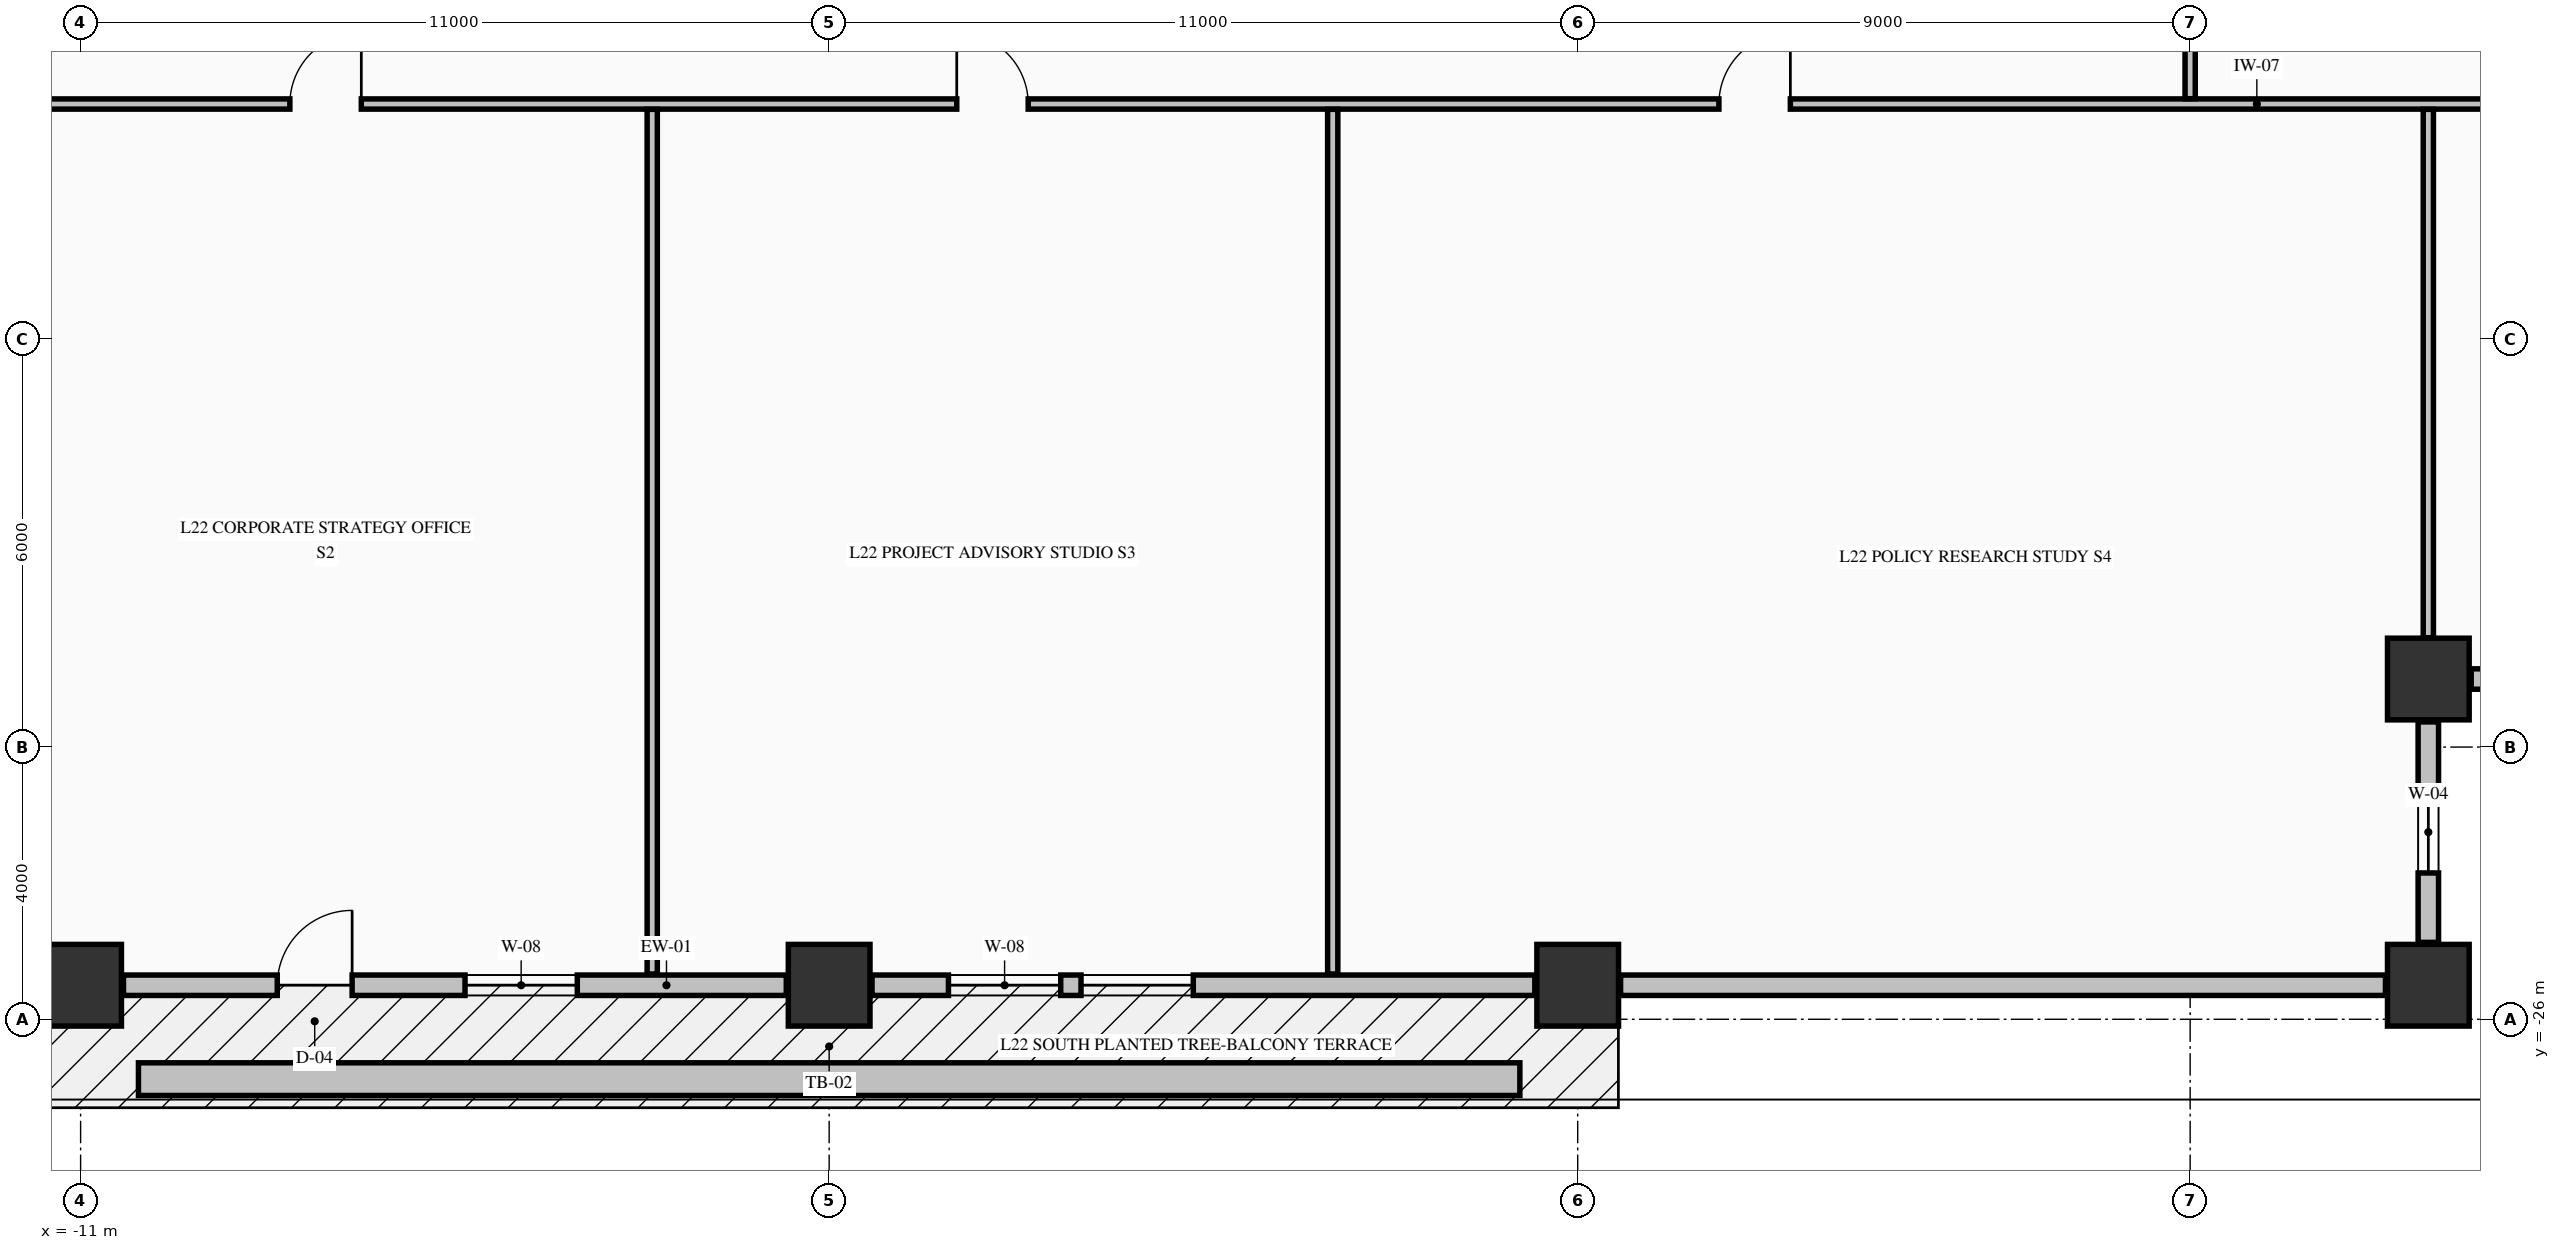
"""IFC4 building model, lengths in metres.
Left out: names, types, materials, properties, quantities, classifications, styles, units other than length and angle.
Written with IfcOpenShell. Run it as: python <this file> out.ifc"""

import sys

from ifc_helpers import new_model, si_unit, direction, frame, frame_2d, origin, origin_2d, place, context, subcontext, project, spatial, rectangle, extrude, element, fill, save


model = new_model("IFC4")
c1 = context("Model", 3, precision=1e-05, world=origin(), true_north=direction((0.0, 1.0)))
c2 = subcontext(c1, "Body", "Model", "MODEL_VIEW")
j1 = project(units=[si_unit("LENGTHUNIT", "METRE"), si_unit("PLANEANGLEUNIT", "RADIAN")], contexts=[c1])
p1 = place(None, origin())
s1 = spatial("IfcSite", under=j1, at=p1, CompositionType="ELEMENT")
p2 = place(p1, origin())
s2 = spatial("IfcBuilding", under=s1, at=p2, CompositionType="ELEMENT")
p3 = place(p2, frame((0.0, 0.0, 91.36)))
s3 = spatial("IfcBuildingStorey", under=s2, at=p3, CompositionType="ELEMENT", Elevation=91.36)
for number, where, z_axis, x_axis in (
    (1, (-11.0, -25.5, -0.25), (0.0, 0.0, 1.0), (1.0, 0.0, 0.0)),
    (2, (0.0, -25.5, -0.25), (0.0, 0.0, 1.0), (1.0, 0.0, 0.0)),
    (3, (11.0, -25.5, -0.25), (0.0, 0.0, 1.0), (1.0, 0.0, 0.0)),
    (4, (23.5, -25.5, -0.25), (0.0, 0.0, 1.0), (1.0, 0.0, 0.0)),
    (5, (23.5, -21.0, -0.25), (0.0, 0.0, 1.0), (1.0, 0.0, 0.0)),
):
    element("IfcColumn", number, at=place(p3, frame(where, z_axis=z_axis, x_axis=x_axis)), inside=s3, PredefinedType="COLUMN", context=c2, shape_type="SweptSolid", body=[
        extrude(rectangle(XDim=1.2, YDim=1.2, at=origin_2d()), origin(), (0.0, 0.0, 1.0), 3.57),
    ])
p4 = place(p3, frame((23.5, -24.87, 0.0), z_axis=(0.0, 0.0, 1.0), x_axis=(0.0, 1.0, 0.0)))
e6 = element("IfcWall", 6, at=p4, inside=s3, PredefinedType="STANDARD", context=c2, shape_type="SweptSolid", body=[
    extrude(rectangle(XDim=3.24, YDim=0.3, at=frame_2d((1.62, 0.0))), origin(), (0.0, 0.0, 1.0), 2.712),
])
p5 = place(p4, frame((1.02, 0.0, 0.82)))
e7 = element("IfcOpeningElement", 7, at=p5, cuts=e6, PredefinedType="OPENING", context=c2, shape_type="SweptSolid", body=[
    extrude(rectangle(XDim=1.2, YDim=1.65, at=frame_2d((0.6, 0.825))), frame((0.0, 0.16, 0.0), z_axis=(0.0, -1.0, 0.0), x_axis=(1.0, 0.0, 0.0)), (0.0, 0.0, 1.0), 0.32),
])
p6 = place(p3, frame((24.13, -21.0, 0.0), z_axis=(0.0, 0.0, 1.0), x_axis=(1.0, 0.0, 0.0)))
e8 = element("IfcWall", 8, at=p6, inside=s3, PredefinedType="STANDARD", context=c2, shape_type="SweptSolid", body=[
    extrude(rectangle(XDim=3.24, YDim=0.3, at=frame_2d((1.62, 0.0))), origin(), (0.0, 0.0, 1.0), 2.712),
])
p7 = place(p6, frame((1.02, 0.0, 0.82)))
e9 = element("IfcOpeningElement", 9, at=p7, cuts=e8, PredefinedType="OPENING", context=c2, shape_type="SweptSolid", body=[
    extrude(rectangle(XDim=1.2, YDim=1.65, at=frame_2d((0.6, 0.825))), frame((0.0, 0.16, 0.0), z_axis=(0.0, -1.0, 0.0), x_axis=(1.0, 0.0, 0.0)), (0.0, 0.0, 1.0), 0.32),
])
p8 = place(p3, frame((-10.37, -25.5, 0.0), z_axis=(0.0, 0.0, 1.0), x_axis=(1.0, 0.0, 0.0)))
e10 = element("IfcWall", 10, at=p8, inside=s3, PredefinedType="STANDARD", context=c2, shape_type="SweptSolid", body=[
    extrude(rectangle(XDim=9.74, YDim=0.3, at=frame_2d((4.87, 0.0))), origin(), (0.0, 0.0, 1.0), 2.712),
])
p9 = place(p8, frame((2.26, 0.0, 0.0)))
e11 = element("IfcOpeningElement", 11, at=p9, cuts=e10, PredefinedType="OPENING", context=c2, shape_type="SweptSolid", body=[
    extrude(rectangle(XDim=1.1, YDim=2.15, at=frame_2d((0.55, 1.075))), frame((0.0, 0.16, 0.0), z_axis=(0.0, -1.0, 0.0), x_axis=(1.0, 0.0, 0.0)), (0.0, 0.0, 1.0), 0.32),
])
p10 = place(p8, frame((5.019, 0.0, 0.8)))
e12 = element("IfcOpeningElement", 12, at=p10, cuts=e10, PredefinedType="OPENING", context=c2, shape_type="SweptSolid", body=[
    extrude(rectangle(XDim=1.65, YDim=1.7, at=frame_2d((0.825, 0.85))), frame((0.0, 0.16, 0.0), z_axis=(0.0, -1.0, 0.0), x_axis=(1.0, 0.0, 0.0)), (0.0, 0.0, 1.0), 0.32),
])
p11 = place(p3, frame((0.63, -25.5, 0.0), z_axis=(0.0, 0.0, 1.0), x_axis=(1.0, 0.0, 0.0)))
e13 = element("IfcWall", 13, at=p11, inside=s3, PredefinedType="STANDARD", context=c2, shape_type="SweptSolid", body=[
    extrude(rectangle(XDim=9.74, YDim=0.3, at=frame_2d((4.87, 0.0))), origin(), (0.0, 0.0, 1.0), 2.712),
])
p12 = place(p11, frame((1.123, 0.0, 0.8)))
e14 = element("IfcOpeningElement", 14, at=p12, cuts=e13, PredefinedType="OPENING", context=c2, shape_type="SweptSolid", body=[
    extrude(rectangle(XDim=1.65, YDim=1.7, at=frame_2d((0.825, 0.85))), frame((0.0, 0.16, 0.0), z_axis=(0.0, -1.0, 0.0), x_axis=(1.0, 0.0, 0.0)), (0.0, 0.0, 1.0), 0.32),
])
p13 = place(p11, frame((3.071, 0.0, 0.8)))
e15 = element("IfcOpeningElement", 15, at=p13, cuts=e13, PredefinedType="OPENING", context=c2, shape_type="SweptSolid", body=[
    extrude(rectangle(XDim=1.65, YDim=1.7, at=frame_2d((0.825, 0.85))), frame((0.0, 0.16, 0.0), z_axis=(0.0, -1.0, 0.0), x_axis=(1.0, 0.0, 0.0)), (0.0, 0.0, 1.0), 0.32),
])
p14 = place(p3, frame((11.63, -25.5, 0.0), z_axis=(0.0, 0.0, 1.0), x_axis=(1.0, 0.0, 0.0)))
e16 = element("IfcWall", 16, at=p14, inside=s3, PredefinedType="STANDARD", context=c2, shape_type="SweptSolid", body=[
    extrude(rectangle(XDim=11.24, YDim=0.3, at=frame_2d((5.62, 0.0))), origin(), (0.0, 0.0, 1.0), 2.712),
])
p15 = place(p3, frame((-22.835, -12.55, 0.0), z_axis=(0.0, 0.0, 1.0), x_axis=(1.0, 0.0, 0.0)))
e17 = element("IfcWall", 17, at=p15, inside=s3, PredefinedType="PARTITIONING", context=c2, shape_type="SweptSolid", body=[
    extrude(rectangle(XDim=50.67, YDim=0.15, at=frame_2d((25.335, 0.0))), origin(), (0.0, 0.0, 1.0), 3.32),
])
p16 = place(p15, frame((7.01, 0.0, 0.0)))
e18 = element("IfcOpeningElement", 18, at=p16, cuts=e17, PredefinedType="OPENING", context=c2, shape_type="SweptSolid", body=[
    extrude(rectangle(XDim=0.95, YDim=2.15, at=frame_2d((0.475, 1.075))), frame((0.0, 0.085, 0.0), z_axis=(0.0, -1.0, 0.0), x_axis=(1.0, 0.0, 0.0)), (0.0, 0.0, 1.0), 0.17),
])
p17 = place(p15, frame((14.91, 0.0, 0.0)))
e19 = element("IfcOpeningElement", 19, at=p17, cuts=e17, PredefinedType="OPENING", context=c2, shape_type="SweptSolid", body=[
    extrude(rectangle(XDim=1.05, YDim=2.15, at=frame_2d((0.525, 1.075))), frame((0.0, 0.085, 0.0), z_axis=(0.0, -1.0, 0.0), x_axis=(1.0, 0.0, 0.0)), (0.0, 0.0, 1.0), 0.17),
])
p18 = place(p15, frame((24.71, 0.0, 0.0)))
e20 = element("IfcOpeningElement", 20, at=p18, cuts=e17, PredefinedType="OPENING", context=c2, shape_type="SweptSolid", body=[
    extrude(rectangle(XDim=1.05, YDim=2.15, at=frame_2d((0.525, 1.075))), frame((0.0, 0.085, 0.0), z_axis=(0.0, -1.0, 0.0), x_axis=(1.0, 0.0, 0.0)), (0.0, 0.0, 1.0), 0.17),
])
p19 = place(p15, frame((35.91, 0.0, 0.0)))
e21 = element("IfcOpeningElement", 21, at=p19, cuts=e17, PredefinedType="OPENING", context=c2, shape_type="SweptSolid", body=[
    extrude(rectangle(XDim=1.05, YDim=2.15, at=frame_2d((0.525, 1.075))), frame((0.0, 0.085, 0.0), z_axis=(0.0, -1.0, 0.0), x_axis=(1.0, 0.0, 0.0)), (0.0, 0.0, 1.0), 0.17),
])
for number, where, z_axis, x_axis in (
    (22, (-2.6, -25.335, 0.0), (0.0, 0.0, 1.0), (0.0, 1.0, 0.0)),
    (23, (7.4, -25.335, 0.0), (0.0, 0.0, 1.0), (0.0, 1.0, 0.0)),
):
    element("IfcWall", number, at=place(p3, frame(where, z_axis=z_axis, x_axis=x_axis)), inside=s3, PredefinedType="PARTITIONING", context=c2, shape_type="SweptSolid", body=[
        extrude(rectangle(XDim=12.707, YDim=0.15, at=frame_2d((6.354, 0.0))), origin(), (0.0, 0.0, 1.0), 3.32),
    ])
p20 = place(p3, frame((20.0, -12.472, 0.0), z_axis=(0.0, 0.0, 1.0), x_axis=(0.0, 1.0, 0.0)))
e24 = element("IfcWall", 24, at=p20, inside=s3, PredefinedType="PARTITIONING", context=c2, shape_type="SweptSolid", body=[
    extrude(rectangle(XDim=2.016, YDim=0.15, at=frame_2d((1.008, 0.0))), origin(), (0.0, 0.0, 1.0), 2.81),
])
p21 = place(p20, frame((0.747, 0.0, 0.0)))
e25 = element("IfcOpeningElement", 25, at=p21, cuts=e24, PredefinedType="OPENING", context=c2, shape_type="SweptSolid", body=[
    extrude(rectangle(XDim=0.95, YDim=2.15, at=frame_2d((0.475, 1.075))), frame((0.0, 0.085, 0.0), z_axis=(0.0, -1.0, 0.0), x_axis=(1.0, 0.0, 0.0)), (0.0, 0.0, 1.0), 0.17),
])
p22 = place(p3, frame((23.5, -20.394, 0.0), z_axis=(0.0, 0.0, 1.0), x_axis=(0.0, 1.0, 0.0)))
e26 = element("IfcWall", 26, at=p22, inside=s3, PredefinedType="PARTITIONING", context=c2, shape_type="SweptSolid", body=[
    extrude(rectangle(XDim=7.766, YDim=0.15, at=frame_2d((3.883, 0.0))), origin(), (0.0, 0.0, 1.0), 3.32),
])
p23 = place(p3, frame((-10.15, -26.88, -0.04), z_axis=(0.0, 0.0, 1.0), x_axis=(1.0, 0.0, 0.0)))
e27 = element("IfcWall", 27, at=p23, inside=s3, PredefinedType="PARAPET", context=c2, shape_type="SweptSolid", body=[
    extrude(rectangle(XDim=20.3, YDim=0.48, at=frame_2d((10.15, 0.0))), origin(), (0.0, 0.0, 1.0), 0.52),
])
p24 = place(p5, origin())
e28 = element("IfcWindow", 28, at=p24, inside=s3, PartitioningType="SINGLE_PANEL", PredefinedType="WINDOW", context=c2, shape_type="SweptSolid", body=[
    extrude(rectangle(XDim=1.2, YDim=1.65, at=frame_2d((0.6, 0.825))), frame((0.0, 0.03, 0.0), z_axis=(0.0, -1.0, 0.0), x_axis=(1.0, 0.0, 0.0)), (0.0, 0.0, 1.0), 0.06),
])
fill(e7, e28)
p25 = place(p9, origin())
e29 = element("IfcDoor", 29, at=p25, inside=s3, OperationType="SINGLE_SWING_RIGHT", PredefinedType="DOOR", context=c2, shape_type="SweptSolid", body=[
    extrude(rectangle(XDim=1.1, YDim=2.15, at=frame_2d((0.55, 1.075))), frame((0.0, 0.025, 0.0), z_axis=(0.0, -1.0, 0.0), x_axis=(1.0, 0.0, 0.0)), (0.0, 0.0, 1.0), 0.05),
])
fill(e11, e29)
p26 = place(p10, origin())
e30 = element("IfcWindow", 30, at=p26, inside=s3, PartitioningType="SINGLE_PANEL", PredefinedType="WINDOW", context=c2, shape_type="SweptSolid", body=[
    extrude(rectangle(XDim=1.65, YDim=1.7, at=frame_2d((0.825, 0.85))), frame((0.0, 0.03, 0.0), z_axis=(0.0, -1.0, 0.0), x_axis=(1.0, 0.0, 0.0)), (0.0, 0.0, 1.0), 0.06),
])
fill(e12, e30)
p27 = place(p12, origin())
e31 = element("IfcWindow", 31, at=p27, inside=s3, PartitioningType="SINGLE_PANEL", PredefinedType="WINDOW", context=c2, shape_type="SweptSolid", body=[
    extrude(rectangle(XDim=1.65, YDim=1.7, at=frame_2d((0.825, 0.85))), frame((0.0, 0.03, 0.0), z_axis=(0.0, -1.0, 0.0), x_axis=(1.0, 0.0, 0.0)), (0.0, 0.0, 1.0), 0.06),
])
fill(e14, e31)
p28 = place(p13, origin())
e32 = element("IfcWindow", 32, at=p28, inside=s3, PartitioningType="SINGLE_PANEL", PredefinedType="WINDOW", context=c2, shape_type="SweptSolid", body=[
    extrude(rectangle(XDim=1.65, YDim=1.7, at=frame_2d((0.825, 0.85))), frame((0.0, 0.03, 0.0), z_axis=(0.0, -1.0, 0.0), x_axis=(1.0, 0.0, 0.0)), (0.0, 0.0, 1.0), 0.06),
])
fill(e15, e32)
p29 = place(p17, origin())
e33 = element("IfcDoor", 33, at=p29, inside=s3, OperationType="SINGLE_SWING_RIGHT", PredefinedType="DOOR", context=c2, shape_type="SweptSolid", body=[
    extrude(rectangle(XDim=1.05, YDim=2.15, at=frame_2d((0.525, 1.075))), frame((0.0, 0.025, 0.0), z_axis=(0.0, -1.0, 0.0), x_axis=(1.0, 0.0, 0.0)), (0.0, 0.0, 1.0), 0.05),
])
fill(e19, e33)
p30 = place(p18, origin())
e34 = element("IfcDoor", 34, at=p30, inside=s3, OperationType="SINGLE_SWING_LEFT", PredefinedType="DOOR", context=c2, shape_type="SweptSolid", body=[
    extrude(rectangle(XDim=1.05, YDim=2.15, at=frame_2d((0.525, 1.075))), frame((0.0, 0.025, 0.0), z_axis=(0.0, -1.0, 0.0), x_axis=(1.0, 0.0, 0.0)), (0.0, 0.0, 1.0), 0.05),
])
fill(e20, e34)
p31 = place(p19, origin())
e35 = element("IfcDoor", 35, at=p31, inside=s3, OperationType="SINGLE_SWING_RIGHT", PredefinedType="DOOR", context=c2, shape_type="SweptSolid", body=[
    extrude(rectangle(XDim=1.05, YDim=2.15, at=frame_2d((0.525, 1.075))), frame((0.0, 0.025, 0.0), z_axis=(0.0, -1.0, 0.0), x_axis=(1.0, 0.0, 0.0)), (0.0, 0.0, 1.0), 0.05),
])
fill(e21, e35)
save(model, sys.argv[1])
